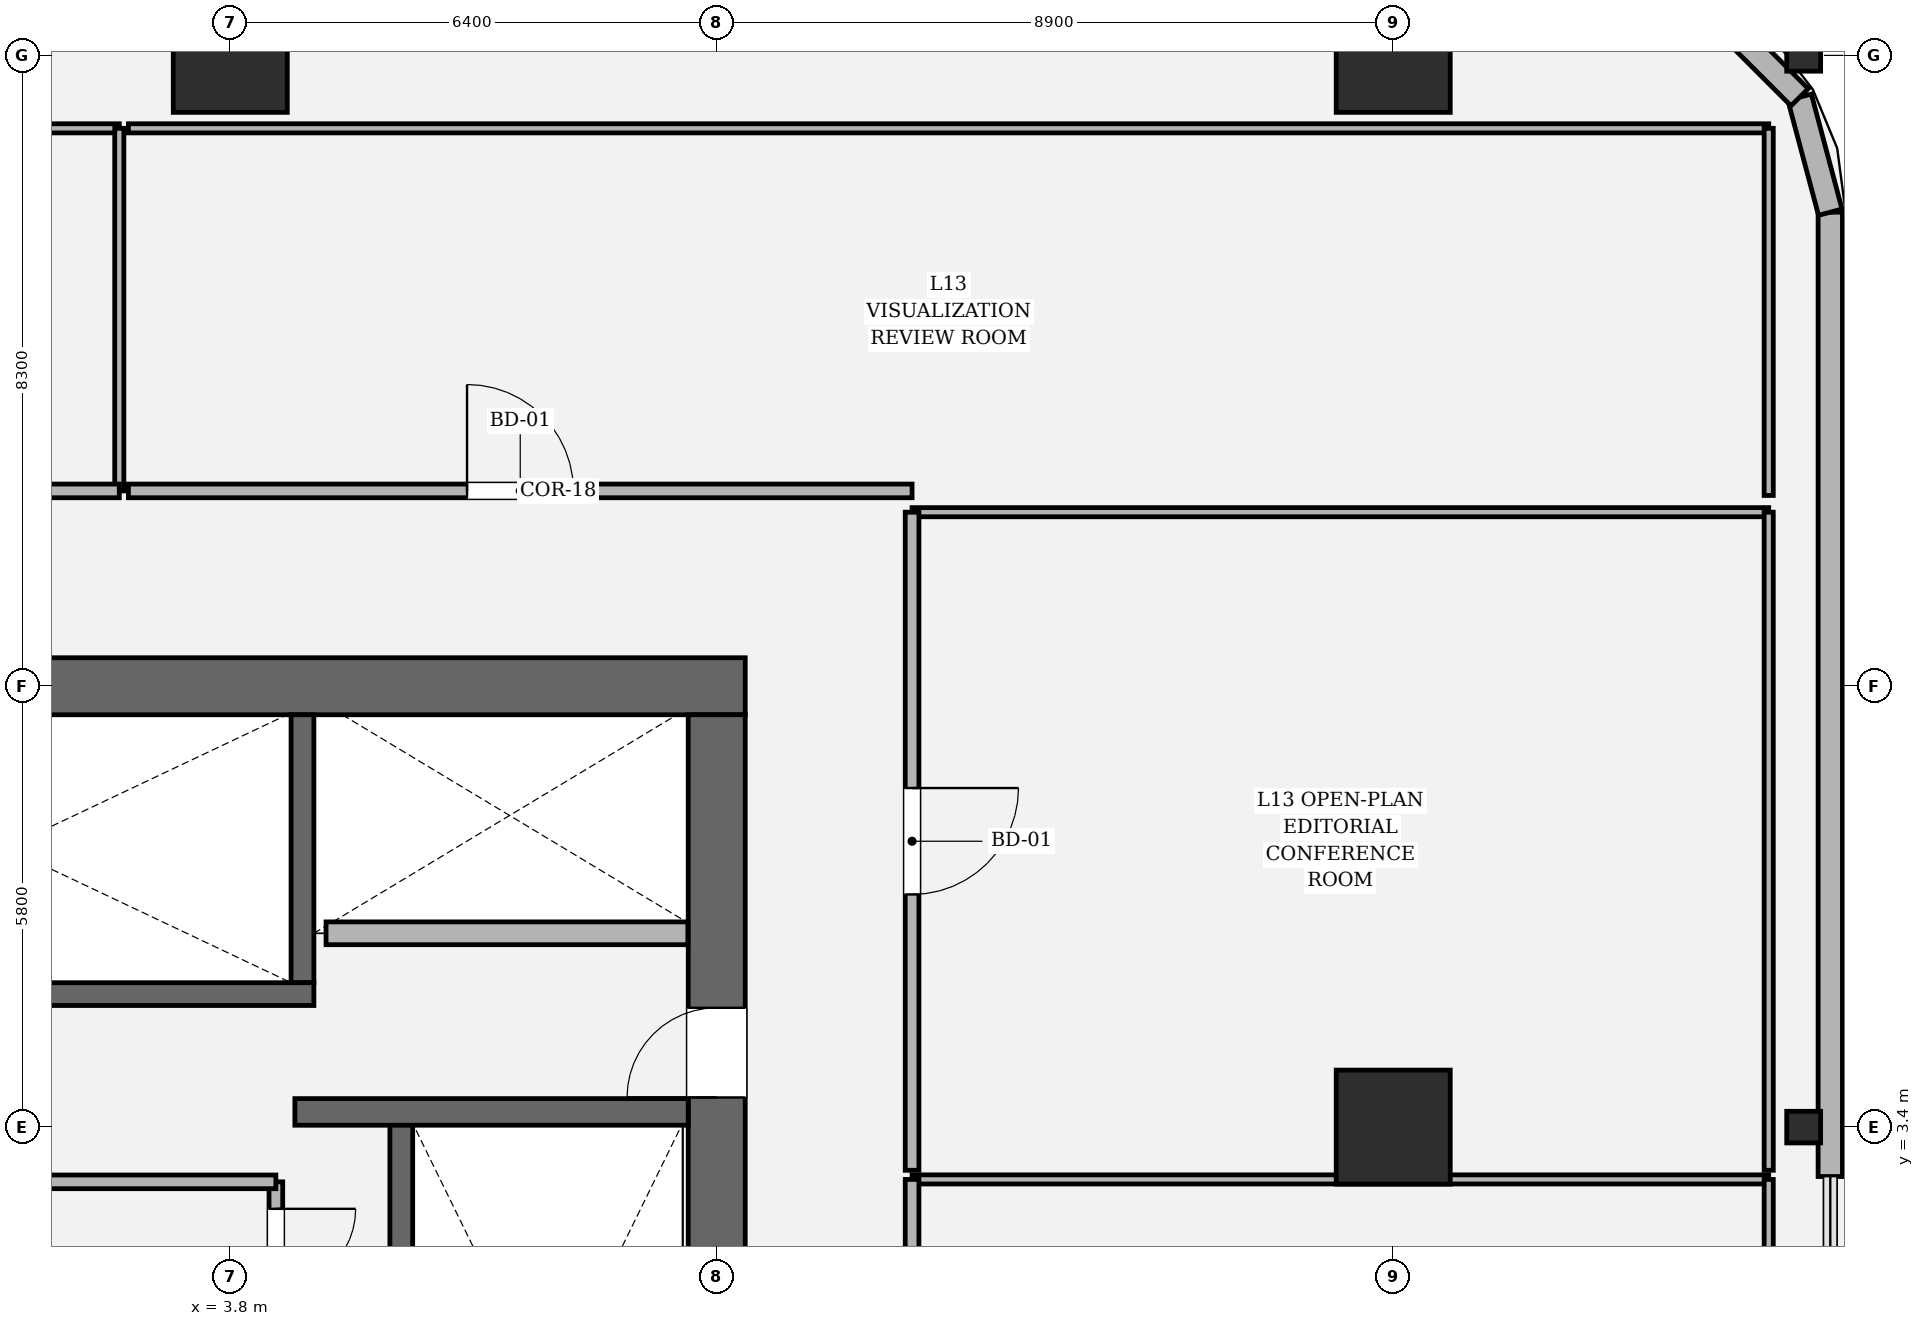
"""IFC4 building model, lengths in metres.
Left out: names, types, materials, properties, quantities, classifications, styles, units other than length and angle.
Written with IfcOpenShell. Run it as: python <this file> out.ifc"""

import sys

from ifc_helpers import new_model, si_unit, direction, frame, frame_2d, origin, origin_2d, place, context, subcontext, project, spatial, rectangle, hollow_rectangle, i_section, extrude, element, fill, save


model = new_model("IFC4")
c1 = context("Model", 3, precision=1e-05, world=origin(), true_north=direction((0.0, 1.0)))
c2 = subcontext(c1, "Body", "Model", "MODEL_VIEW")
j1 = project(units=[si_unit("LENGTHUNIT", "METRE"), si_unit("PLANEANGLEUNIT", "RADIAN")], contexts=[c1])
p1 = place(None, origin())
s1 = spatial("IfcSite", under=j1, at=p1, CompositionType="ELEMENT")
p2 = place(p1, origin())
s2 = spatial("IfcBuilding", under=s1, at=p2, CompositionType="ELEMENT")
p3 = place(p2, frame((0.0, 0.0, 60.6)))
s3 = spatial("IfcBuildingStorey", under=s2, at=p3, CompositionType="ELEMENT", Elevation=60.6)
p4 = place(p3, frame((-10.575, 9.2, 0.0), z_axis=(0.0, 0.0, 1.0), x_axis=(1.0, 0.0, 0.0)))
e1 = element("IfcWall", 1, at=p4, inside=s3, PredefinedType="SHEAR", context=c2, shape_type="SweptSolid", body=[
    extrude(rectangle(XDim=21.15, YDim=0.75, at=frame_2d((10.575, 0.0))), origin(), (0.0, 0.0, 1.0), 4.05),
])
p5 = place(p3, frame((10.2, 8.825, 0.0), z_axis=(0.0, 0.0, 1.0), x_axis=(0.0, -1.0, 0.0)))
e2 = element("IfcWall", 2, at=p5, inside=s3, PredefinedType="SHEAR", context=c2, shape_type="SweptSolid", body=[
    extrude(rectangle(XDim=17.65, YDim=0.75, at=frame_2d((8.825, 0.0))), origin(), (0.0, 0.0, 1.0), 4.05),
])
p6 = place(p5, frame((3.855, 0.0, 0.0)))
e3 = element("IfcOpeningElement", 3, at=p6, cuts=e2, PredefinedType="OPENING", context=c2, shape_type="SweptSolid", body=[
    extrude(rectangle(XDim=1.18, YDim=2.2, at=frame_2d((0.59, 1.1))), frame((0.0, 0.385, 0.0), z_axis=(0.0, -1.0, 0.0), x_axis=(1.0, 0.0, 0.0)), (0.0, 0.0, 1.0), 0.77),
])
p7 = place(p3, frame((6.05, 3.45, 0.0), z_axis=(0.0, 0.0, 1.0), x_axis=(0.0, -1.0, 0.0)))
e4 = element("IfcWall", 4, at=p7, inside=s3, PredefinedType="SOLIDWALL", context=c2, shape_type="SweptSolid", body=[
    extrude(rectangle(XDim=8.95, YDim=0.3, at=frame_2d((4.475, 0.0))), origin(), (0.0, 0.0, 1.0), 4.05),
])
p8 = place(p3, frame((4.75, 8.825, 0.0), z_axis=(0.0, 0.0, 1.0), x_axis=(0.0, -1.0, 0.0)))
e5 = element("IfcWall", 5, at=p8, inside=s3, PredefinedType="SOLIDWALL", context=c2, shape_type="SweptSolid", body=[
    extrude(rectangle(XDim=3.525, YDim=0.3, at=frame_2d((1.762, 0.0))), origin(), (0.0, 0.0, 1.0), 4.05),
])
p9 = place(p3, frame((-4.9, 5.15, 0.0), z_axis=(0.0, 0.0, 1.0), x_axis=(1.0, 0.0, 0.0)))
e6 = element("IfcWall", 6, at=p9, inside=s3, PredefinedType="SOLIDWALL", context=c2, shape_type="SweptSolid", body=[
    extrude(rectangle(XDim=9.8, YDim=0.3, at=frame_2d((4.9, 0.0))), origin(), (0.0, 0.0, 1.0), 4.05),
])
p10 = place(p9, frame((0.56, 0.0, 0.0)))
e7 = element("IfcOpeningElement", 7, at=p10, cuts=e6, PredefinedType="OPENING", context=c2, shape_type="SweptSolid", body=[
    extrude(rectangle(XDim=1.18, YDim=2.2, at=frame_2d((0.59, 1.1))), frame((0.0, 0.16, 0.0), z_axis=(0.0, -1.0, 0.0), x_axis=(1.0, 0.0, 0.0)), (0.0, 0.0, 1.0), 0.32),
])
p11 = place(p3, frame((4.65, 3.6, 0.0), z_axis=(0.0, 0.0, 1.0), x_axis=(1.0, 0.0, 0.0)))
e8 = element("IfcWall", 8, at=p11, inside=s3, PredefinedType="SOLIDWALL", context=c2, shape_type="SweptSolid", body=[
    extrude(rectangle(XDim=5.175, YDim=0.35, at=frame_2d((2.587, 0.0))), origin(), (0.0, 0.0, 1.0), 4.05),
])
for number, where, z_axis, x_axis in (
    (9, (19.1, 3.4, 0.0), (0.0, 0.0, 1.0), (1.0, 0.0, 0.0)),
    (10, (19.1, 17.5, 0.0), (0.0, 0.0, 1.0), (1.0, 0.0, 0.0)),
    (11, (3.8, 17.5, 0.0), (0.0, 0.0, 1.0), (1.0, 0.0, 0.0)),
):
    element("IfcColumn", number, at=place(p3, frame(where, z_axis=z_axis, x_axis=x_axis)), inside=s3, PredefinedType="COLUMN", context=c2, shape_type="SweptSolid", body=[
        extrude(hollow_rectangle(XDim=1.5, YDim=1.5, WallThickness=0.045, at=origin_2d()), origin(), (0.0, 0.0, 1.0), 4.05),
    ])
for number, where, z_axis, x_axis in (
    (12, (24.5, 3.4, 0.0), (0.0, 0.0, 1.0), (0.0, 1.0, 0.0)),
    (13, (24.5, 17.5, 0.0), (0.0, 0.0, 1.0), (0.0, 1.0, 0.0)),
):
    element("IfcColumn", number, at=place(p3, frame(where, z_axis=z_axis, x_axis=x_axis)), inside=s3, PredefinedType="COLUMN", context=c2, shape_type="SweptSolid", body=[
        extrude(i_section(OverallWidth=0.416, OverallDepth=0.446, WebThickness=0.039, FlangeThickness=0.062, FilletRadius=0.018, at=origin_2d()), origin(), (0.0, 0.0, 1.0), 4.048),
    ])
p12 = place(p3, frame((24.85, 2.75, 0.0), z_axis=(0.0, 0.0, 1.0), x_axis=(0.0, 1.0, 0.0)))
e14 = element("IfcWall", 14, at=p12, inside=s3, PredefinedType="SOLIDWALL", context=c2, shape_type="SweptSolid", body=[
    extrude(rectangle(XDim=12.687, YDim=0.32, at=frame_2d((6.344, 0.0))), origin(), (0.0, 0.0, 1.0), 2.524),
])
p13 = place(p3, frame((24.85, 15.437, 0.0), z_axis=(0.0, 0.0, 1.0), x_axis=(-0.257847112249, 0.966185730957, 0.0)))
e15 = element("IfcWall", 15, at=p13, inside=s3, PredefinedType="SOLIDWALL", context=c2, shape_type="SweptSolid", body=[
    extrude(rectangle(XDim=1.565, YDim=0.32, at=frame_2d((0.783, 0.0))), origin(), (0.0, 0.0, 1.0), 2.524),
])
p14 = place(p3, frame((24.447, 16.949, 0.0), z_axis=(0.0, 0.0, 1.0), x_axis=(-0.707106781187, 0.707106781187, 0.0)))
e16 = element("IfcWall", 16, at=p14, inside=s3, PredefinedType="SOLIDWALL", context=c2, shape_type="SweptSolid", body=[
    extrude(rectangle(XDim=1.552, YDim=0.32, at=frame_2d((0.776, 0.0))), origin(), (0.0, 0.0, 1.0), 2.484),
])
p15 = place(p3, frame((5.06, 5.95, 0.0), z_axis=(0.0, 0.0, 1.0), x_axis=(1.0, 0.0, 0.0)))
e17 = element("IfcWall", 17, at=p15, inside=s3, PredefinedType="SOLIDWALL", context=c2, shape_type="SweptSolid", body=[
    extrude(rectangle(XDim=4.76, YDim=0.3, at=frame_2d((2.38, 0.0))), origin(), (0.0, 0.0, 1.0), 3.81),
])
p16 = place(p3, frame((4.4, 0.92, 0.0), z_axis=(0.0, 0.0, 1.0), x_axis=(0.0, 1.0, 0.0)))
e18 = element("IfcWall", 18, at=p16, inside=s3, PredefinedType="PARTITIONING", context=c2, shape_type="SweptSolid", body=[
    extrude(rectangle(XDim=1.76, YDim=0.18, at=frame_2d((0.88, 0.0))), origin(), (0.0, 0.0, 1.0), 3.81),
])
p17 = place(p16, frame((0.355, 0.0, 0.0)))
e19 = element("IfcOpeningElement", 19, at=p17, cuts=e18, PredefinedType="OPENING", context=c2, shape_type="SweptSolid", body=[
    extrude(rectangle(XDim=1.05, YDim=2.2, at=frame_2d((0.525, 1.1))), frame((0.0, 0.1, 0.0), z_axis=(0.0, -1.0, 0.0), x_axis=(1.0, 0.0, 0.0)), (0.0, 0.0, 1.0), 0.2),
])
p18 = place(p3, frame((4.4, 2.68, 0.0), z_axis=(0.0, 0.0, 1.0), x_axis=(-1.0, 0.0, 0.0)))
e20 = element("IfcWall", 20, at=p18, inside=s3, PredefinedType="PARTITIONING", context=c2, shape_type="SweptSolid", body=[
    extrude(rectangle(XDim=4.15, YDim=0.18, at=frame_2d((2.075, 0.0))), origin(), (0.0, 0.0, 1.0), 3.81),
])
p19 = place(p3, frame((12.77, 2.712, 0.0), z_axis=(0.0, 0.0, 1.0), x_axis=(1.0, 0.0, 0.0)))
e21 = element("IfcWall", 21, at=p19, inside=s3, PredefinedType="PARTITIONING", context=c2, shape_type="SweptSolid", body=[
    extrude(rectangle(XDim=11.27, YDim=0.12, at=frame_2d((5.635, 0.0))), origin(), (0.0, 0.0, 1.0), 3.104),
])
p20 = place(p3, frame((24.04, 2.712, 0.0), z_axis=(0.0, 0.0, 1.0), x_axis=(0.0, -1.0, 0.0)))
e22 = element("IfcWall", 22, at=p20, inside=s3, PredefinedType="PARTITIONING", context=c2, shape_type="SweptSolid", body=[
    extrude(rectangle(XDim=6.81, YDim=0.12, at=frame_2d((3.405, 0.0))), origin(), (0.0, 0.0, 1.0), 2.484),
])
p21 = place(p3, frame((12.77, -4.098, 0.0), z_axis=(0.0, 0.0, 1.0), x_axis=(0.0, 1.0, 0.0)))
e23 = element("IfcWall", 23, at=p21, inside=s3, PredefinedType="PARTITIONING", context=c2, shape_type="SweptSolid", body=[
    extrude(rectangle(XDim=6.81, YDim=0.18, at=frame_2d((3.405, 0.0))), origin(), (0.0, 0.0, 1.0), 3.104),
])
p22 = place(p21, frame((2.88, 0.0, 0.0)))
e24 = element("IfcOpeningElement", 24, at=p22, cuts=e23, PredefinedType="OPENING", context=c2, shape_type="SweptSolid", body=[
    extrude(rectangle(XDim=1.05, YDim=2.2, at=frame_2d((0.525, 1.1))), frame((0.0, 0.1, 0.0), z_axis=(0.0, -1.0, 0.0), x_axis=(1.0, 0.0, 0.0)), (0.0, 0.0, 1.0), 0.2),
])
p23 = place(p3, frame((12.77, 11.49, 0.0), z_axis=(0.0, 0.0, 1.0), x_axis=(1.0, 0.0, 0.0)))
e25 = element("IfcWall", 25, at=p23, inside=s3, PredefinedType="PARTITIONING", context=c2, shape_type="SweptSolid", body=[
    extrude(rectangle(XDim=11.27, YDim=0.12, at=frame_2d((5.635, 0.0))), origin(), (0.0, 0.0, 1.0), 3.104),
])
p24 = place(p3, frame((24.04, 11.49, 0.0), z_axis=(0.0, 0.0, 1.0), x_axis=(0.0, -1.0, 0.0)))
e26 = element("IfcWall", 26, at=p24, inside=s3, PredefinedType="PARTITIONING", context=c2, shape_type="SweptSolid", body=[
    extrude(rectangle(XDim=8.658, YDim=0.12, at=frame_2d((4.329, 0.0))), origin(), (0.0, 0.0, 1.0), 2.484),
])
p25 = place(p3, frame((12.77, 2.832, 0.0), z_axis=(0.0, 0.0, 1.0), x_axis=(0.0, 1.0, 0.0)))
e27 = element("IfcWall", 27, at=p25, inside=s3, PredefinedType="PARTITIONING", context=c2, shape_type="SweptSolid", body=[
    extrude(rectangle(XDim=8.658, YDim=0.18, at=frame_2d((4.329, 0.0))), origin(), (0.0, 0.0, 1.0), 3.104),
])
p26 = place(p25, frame((3.629, 0.0, 0.0)))
e28 = element("IfcOpeningElement", 28, at=p26, cuts=e27, PredefinedType="OPENING", context=c2, shape_type="SweptSolid", body=[
    extrude(rectangle(XDim=1.4, YDim=2.25, at=frame_2d((0.7, 1.125))), frame((0.0, 0.1, 0.0), z_axis=(0.0, -1.0, 0.0), x_axis=(1.0, 0.0, 0.0)), (0.0, 0.0, 1.0), 0.2),
])
p27 = place(p3, frame((-18.14, 16.54, 0.0), z_axis=(0.0, 0.0, 1.0), x_axis=(1.0, 0.0, 0.0)))
e29 = element("IfcWall", 29, at=p27, inside=s3, PredefinedType="PARTITIONING", context=c2, shape_type="SweptSolid", body=[
    extrude(rectangle(XDim=20.48, YDim=0.12, at=frame_2d((10.24, 0.0))), origin(), (0.0, 0.0, 1.0), 3.104),
])
p28 = place(p3, frame((2.34, 16.54, 0.0), z_axis=(0.0, 0.0, 1.0), x_axis=(0.0, -1.0, 0.0)))
e30 = element("IfcWall", 30, at=p28, inside=s3, PredefinedType="PARTITIONING", context=c2, shape_type="SweptSolid", body=[
    extrude(rectangle(XDim=4.77, YDim=0.12, at=frame_2d((2.385, 0.0))), origin(), (0.0, 0.0, 1.0), 3.81),
])
p29 = place(p3, frame((2.34, 11.77, 0.0), z_axis=(0.0, 0.0, 1.0), x_axis=(-1.0, 0.0, 0.0)))
e31 = element("IfcWall", 31, at=p29, inside=s3, PredefinedType="PARTITIONING", context=c2, shape_type="SweptSolid", body=[
    extrude(rectangle(XDim=15.11, YDim=0.18, at=frame_2d((7.555, 0.0))), origin(), (0.0, 0.0, 1.0), 3.104),
])
p30 = place(p29, frame((7.03, 0.0, 0.0)))
e32 = element("IfcOpeningElement", 32, at=p30, cuts=e31, PredefinedType="OPENING", context=c2, shape_type="SweptSolid", body=[
    extrude(rectangle(XDim=1.05, YDim=2.2, at=frame_2d((0.525, 1.1))), frame((0.0, 0.1, 0.0), z_axis=(0.0, -1.0, 0.0), x_axis=(1.0, 0.0, 0.0)), (0.0, 0.0, 1.0), 0.2),
])
p31 = place(p3, frame((2.46, 16.54, 0.0), z_axis=(0.0, 0.0, 1.0), x_axis=(1.0, 0.0, 0.0)))
e33 = element("IfcWall", 33, at=p31, inside=s3, PredefinedType="PARTITIONING", context=c2, shape_type="SweptSolid", body=[
    extrude(rectangle(XDim=21.58, YDim=0.12, at=frame_2d((10.79, 0.0))), origin(), (0.0, 0.0, 1.0), 3.104),
])
p32 = place(p3, frame((24.04, 16.54, 0.0), z_axis=(0.0, 0.0, 1.0), x_axis=(0.0, -1.0, 0.0)))
e34 = element("IfcWall", 34, at=p32, inside=s3, PredefinedType="PARTITIONING", context=c2, shape_type="SweptSolid", body=[
    extrude(rectangle(XDim=4.83, YDim=0.12, at=frame_2d((2.415, 0.0))), origin(), (0.0, 0.0, 1.0), 3.81),
])
p33 = place(p3, frame((12.77, 11.77, 0.0), z_axis=(0.0, 0.0, 1.0), x_axis=(-1.0, 0.0, 0.0)))
e35 = element("IfcWall", 35, at=p33, inside=s3, PredefinedType="PARTITIONING", context=c2, shape_type="SweptSolid", body=[
    extrude(rectangle(XDim=10.31, YDim=0.18, at=frame_2d((5.155, 0.0))), origin(), (0.0, 0.0, 1.0), 3.104),
])
p34 = place(p33, frame((4.455, 0.0, 0.0)))
e36 = element("IfcOpeningElement", 36, at=p34, cuts=e35, PredefinedType="OPENING", context=c2, shape_type="SweptSolid", body=[
    extrude(rectangle(XDim=1.4, YDim=2.25, at=frame_2d((0.7, 1.125))), frame((0.0, 0.1, 0.0), z_axis=(0.0, -1.0, 0.0), x_axis=(1.0, 0.0, 0.0)), (0.0, 0.0, 1.0), 0.2),
])
p35 = place(p6, origin())
e37 = element("IfcDoor", 37, at=p35, inside=s3, OperationType="SINGLE_SWING_RIGHT", PredefinedType="DOOR", context=c2, shape_type="SweptSolid", body=[
    extrude(rectangle(XDim=1.18, YDim=2.2, at=frame_2d((0.59, 1.1))), frame((0.0, 0.025, 0.0), z_axis=(0.0, -1.0, 0.0), x_axis=(1.0, 0.0, 0.0)), (0.0, 0.0, 1.0), 0.05),
])
fill(e3, e37)
p36 = place(p17, origin())
e38 = element("IfcDoor", 38, at=p36, inside=s3, OperationType="SINGLE_SWING_RIGHT", PredefinedType="DOOR", context=c2, shape_type="SweptSolid", body=[
    extrude(rectangle(XDim=1.05, YDim=2.2, at=frame_2d((0.525, 1.1))), frame((0.0, 0.025, 0.0), z_axis=(0.0, -1.0, 0.0), x_axis=(1.0, 0.0, 0.0)), (0.0, 0.0, 1.0), 0.05),
])
fill(e19, e38)
p37 = place(p26, origin())
e39 = element("IfcDoor", 39, at=p37, inside=s3, OperationType="SINGLE_SWING_RIGHT", PredefinedType="DOOR", context=c2, shape_type="SweptSolid", body=[
    extrude(rectangle(XDim=1.4, YDim=2.25, at=frame_2d((0.7, 1.125))), frame((0.0, 0.025, 0.0), z_axis=(0.0, -1.0, 0.0), x_axis=(1.0, 0.0, 0.0)), (0.0, 0.0, 1.0), 0.05),
])
fill(e28, e39)
p38 = place(p34, origin())
e40 = element("IfcDoor", 40, at=p38, inside=s3, OperationType="SINGLE_SWING_RIGHT", PredefinedType="DOOR", context=c2, shape_type="SweptSolid", body=[
    extrude(rectangle(XDim=1.4, YDim=2.25, at=frame_2d((0.7, 1.125))), frame((0.0, 0.025, 0.0), z_axis=(0.0, -1.0, 0.0), x_axis=(1.0, 0.0, 0.0)), (0.0, 0.0, 1.0), 0.05),
])
fill(e36, e40)
save(model, sys.argv[1])
